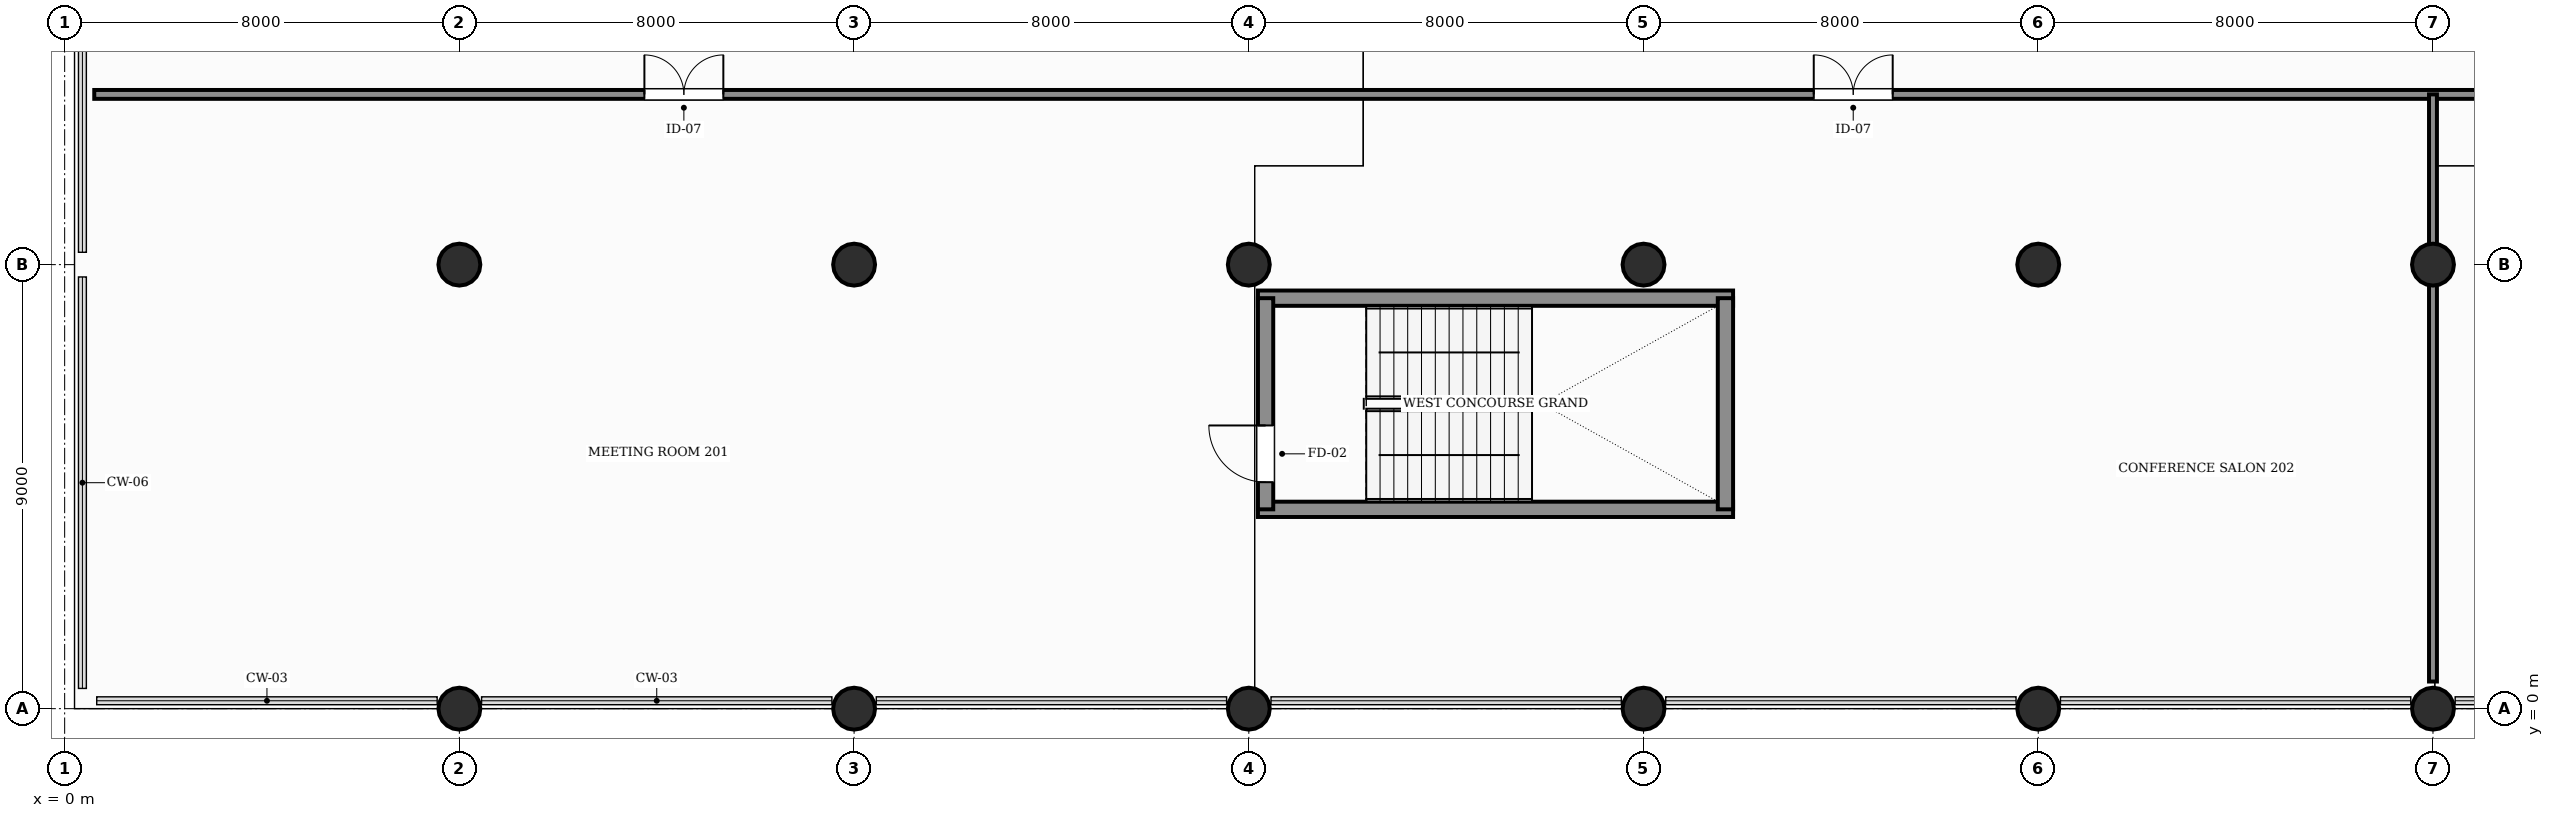
"""IFC4 building model, lengths in metres.
Left out: names, types, materials, properties, quantities, classifications, styles, units other than length and angle.
Written with IfcOpenShell. Run it as: python <this file> out.ifc"""

import sys

from ifc_helpers import new_model, si_unit, direction, frame, frame_2d, origin, origin_2d, place, context, subcontext, project, spatial, rectangle, circle, extrude, element, fill, save


model = new_model("IFC4")
c1 = context("Model", 3, precision=1e-05, world=origin(), true_north=direction((0.0, 1.0)))
c2 = subcontext(c1, "Body", "Model", "MODEL_VIEW")
j1 = project(units=[si_unit("LENGTHUNIT", "METRE"), si_unit("PLANEANGLEUNIT", "RADIAN")], contexts=[c1])
p1 = place(None, origin())
s1 = spatial("IfcSite", under=j1, at=p1, CompositionType="ELEMENT")
p2 = place(p1, origin())
s2 = spatial("IfcBuilding", under=s1, at=p2, CompositionType="ELEMENT")
p3 = place(p2, frame((0.0, 0.0, 11.4)))
s3 = spatial("IfcBuildingStorey", under=s2, at=p3, CompositionType="ELEMENT", Elevation=11.4)
for number, where, z_axis, x_axis in (
    (1, (8.0, 0.0, 0.0), (0.0, 0.0, 1.0), (1.0, 0.0, 0.0)),
    (2, (8.0, 9.0, 0.0), (0.0, 0.0, 1.0), (1.0, 0.0, 0.0)),
    (3, (16.0, 0.0, 0.0), (0.0, 0.0, 1.0), (1.0, 0.0, 0.0)),
    (4, (16.0, 9.0, 0.0), (0.0, 0.0, 1.0), (1.0, 0.0, 0.0)),
    (5, (24.0, 0.0, 0.0), (0.0, 0.0, 1.0), (1.0, 0.0, 0.0)),
    (6, (24.0, 9.0, 0.0), (0.0, 0.0, 1.0), (1.0, 0.0, 0.0)),
    (7, (32.0, 0.0, 0.0), (0.0, 0.0, 1.0), (1.0, 0.0, 0.0)),
    (8, (32.0, 9.0, 0.0), (0.0, 0.0, 1.0), (1.0, 0.0, 0.0)),
    (9, (40.0, 0.0, 0.0), (0.0, 0.0, 1.0), (1.0, 0.0, 0.0)),
    (10, (40.0, 9.0, 0.0), (0.0, 0.0, 1.0), (1.0, 0.0, 0.0)),
    (11, (48.0, 0.0, 0.0), (0.0, 0.0, 1.0), (1.0, 0.0, 0.0)),
    (12, (48.0, 9.0, 0.0), (0.0, 0.0, 1.0), (1.0, 0.0, 0.0)),
):
    element("IfcColumn", number, at=place(p3, frame(where, z_axis=z_axis, x_axis=x_axis)), inside=s3, PredefinedType="COLUMN", context=c2, shape_type="SweptSolid", body=[
        extrude(circle(Radius=0.425, at=origin_2d()), origin(), (0.0, 0.0, 1.0), 4.8),
    ])
for number, where, z_axis, x_axis in (
    (13, (24.185, 4.04, 0.0), (0.0, 0.0, 1.0), (1.0, 0.0, 0.0)),
    (14, (24.185, 8.32, 0.0), (0.0, 0.0, 1.0), (1.0, 0.0, 0.0)),
):
    element("IfcWall", number, at=place(p3, frame(where, z_axis=z_axis, x_axis=x_axis)), inside=s3, PredefinedType="SHEAR", context=c2, shape_type="SweptSolid", body=[
        extrude(rectangle(XDim=9.63, YDim=0.31, at=frame_2d((4.815, 0.0))), origin(), (0.0, 0.0, 1.0), 4.8),
    ])
p4 = place(p3, frame((24.34, 4.04, 0.0), z_axis=(0.0, 0.0, 1.0), x_axis=(0.0, 1.0, 0.0)))
e15 = element("IfcWall", 15, at=p4, inside=s3, PredefinedType="SHEAR", context=c2, shape_type="SweptSolid", body=[
    extrude(rectangle(XDim=4.28, YDim=0.31, at=frame_2d((2.14, 0.0))), origin(), (0.0, 0.0, 1.0), 4.8),
])
p5 = place(p4, frame((0.55, 0.0, 0.0)))
e16 = element("IfcOpeningElement", 16, at=p5, cuts=e15, PredefinedType="OPENING", context=c2, shape_type="SweptSolid", body=[
    extrude(rectangle(XDim=1.15, YDim=2.2, at=frame_2d((0.575, 1.1))), frame((0.0, 0.165, 0.0), z_axis=(0.0, -1.0, 0.0), x_axis=(1.0, 0.0, 0.0)), (0.0, 0.0, 1.0), 0.33),
])
p6 = place(p3, frame((33.66, 4.04, 0.0), z_axis=(0.0, 0.0, 1.0), x_axis=(0.0, 1.0, 0.0)))
e17 = element("IfcWall", 17, at=p6, inside=s3, PredefinedType="SHEAR", context=c2, shape_type="SweptSolid", body=[
    extrude(rectangle(XDim=4.28, YDim=0.31, at=frame_2d((2.14, 0.0))), origin(), (0.0, 0.0, 1.0), 4.8),
])
p7 = place(p3, frame((0.6, 12.45, 0.0), z_axis=(0.0, 0.0, 1.0), x_axis=(1.0, 0.0, 0.0)))
e18 = element("IfcWall", 18, at=p7, inside=s3, PredefinedType="PARTITIONING", context=c2, shape_type="SweptSolid", body=[
    extrude(rectangle(XDim=118.8, YDim=0.18, at=frame_2d((59.4, 0.0))), origin(), (0.0, 0.0, 1.0), 3.4),
])
p8 = place(p7, frame((11.15, 0.0, 0.0)))
e19 = element("IfcOpeningElement", 19, at=p8, cuts=e18, PredefinedType="OPENING", context=c2, shape_type="SweptSolid", body=[
    extrude(rectangle(XDim=1.6, YDim=2.3, at=frame_2d((0.8, 1.15))), frame((0.0, 0.1, 0.0), z_axis=(0.0, -1.0, 0.0), x_axis=(1.0, 0.0, 0.0)), (0.0, 0.0, 1.0), 0.2),
])
p9 = place(p7, frame((34.85, 0.0, 0.0)))
e20 = element("IfcOpeningElement", 20, at=p9, cuts=e18, PredefinedType="OPENING", context=c2, shape_type="SweptSolid", body=[
    extrude(rectangle(XDim=1.6, YDim=2.3, at=frame_2d((0.8, 1.15))), frame((0.0, 0.1, 0.0), z_axis=(0.0, -1.0, 0.0), x_axis=(1.0, 0.0, 0.0)), (0.0, 0.0, 1.0), 0.2),
])
p10 = place(p7, frame((58.85, 0.0, 0.0)))
e21 = element("IfcOpeningElement", 21, at=p10, cuts=e18, PredefinedType="OPENING", context=c2, shape_type="SweptSolid", body=[
    extrude(rectangle(XDim=1.6, YDim=2.3, at=frame_2d((0.8, 1.15))), frame((0.0, 0.1, 0.0), z_axis=(0.0, -1.0, 0.0), x_axis=(1.0, 0.0, 0.0)), (0.0, 0.0, 1.0), 0.2),
])
p11 = place(p7, frame((82.85, 0.0, 0.0)))
e22 = element("IfcOpeningElement", 22, at=p11, cuts=e18, PredefinedType="OPENING", context=c2, shape_type="SweptSolid", body=[
    extrude(rectangle(XDim=1.6, YDim=2.3, at=frame_2d((0.8, 1.15))), frame((0.0, 0.1, 0.0), z_axis=(0.0, -1.0, 0.0), x_axis=(1.0, 0.0, 0.0)), (0.0, 0.0, 1.0), 0.2),
])
p12 = place(p7, frame((106.55, 0.0, 0.0)))
e23 = element("IfcOpeningElement", 23, at=p12, cuts=e18, PredefinedType="OPENING", context=c2, shape_type="SweptSolid", body=[
    extrude(rectangle(XDim=1.6, YDim=2.3, at=frame_2d((0.8, 1.15))), frame((0.0, 0.1, 0.0), z_axis=(0.0, -1.0, 0.0), x_axis=(1.0, 0.0, 0.0)), (0.0, 0.0, 1.0), 0.2),
])
p13 = place(p3, frame((48.0, 0.55, 0.0), z_axis=(0.0, 0.0, 1.0), x_axis=(0.0, 1.0, 0.0)))
e24 = element("IfcWall", 24, at=p13, inside=s3, PredefinedType="PARTITIONING", context=c2, shape_type="SweptSolid", body=[
    extrude(rectangle(XDim=11.9, YDim=0.16, at=frame_2d((5.95, 0.0))), origin(), (0.0, 0.0, 1.0), 3.4),
])
p14 = place(p5, origin())
e25 = element("IfcDoor", 25, at=p14, inside=s3, OperationType="SINGLE_SWING_RIGHT", PredefinedType="DOOR", context=c2, shape_type="SweptSolid", body=[
    extrude(rectangle(XDim=1.15, YDim=2.2, at=frame_2d((0.575, 1.1))), frame((0.0, 0.025, 0.0), z_axis=(0.0, -1.0, 0.0), x_axis=(1.0, 0.0, 0.0)), (0.0, 0.0, 1.0), 0.05),
])
fill(e16, e25)
p15 = place(p8, origin())
e26 = element("IfcDoor", 26, at=p15, inside=s3, OperationType="DOUBLE_DOOR_SINGLE_SWING", PredefinedType="DOOR", context=c2, shape_type="SweptSolid", body=[
    extrude(rectangle(XDim=1.6, YDim=2.3, at=frame_2d((0.8, 1.15))), frame((0.0, 0.025, 0.0), z_axis=(0.0, -1.0, 0.0), x_axis=(1.0, 0.0, 0.0)), (0.0, 0.0, 1.0), 0.05),
])
fill(e19, e26)
p16 = place(p9, origin())
e27 = element("IfcDoor", 27, at=p16, inside=s3, OperationType="DOUBLE_DOOR_SINGLE_SWING", PredefinedType="DOOR", context=c2, shape_type="SweptSolid", body=[
    extrude(rectangle(XDim=1.6, YDim=2.3, at=frame_2d((0.8, 1.15))), frame((0.0, 0.025, 0.0), z_axis=(0.0, -1.0, 0.0), x_axis=(1.0, 0.0, 0.0)), (0.0, 0.0, 1.0), 0.05),
])
fill(e20, e27)
save(model, sys.argv[1])
